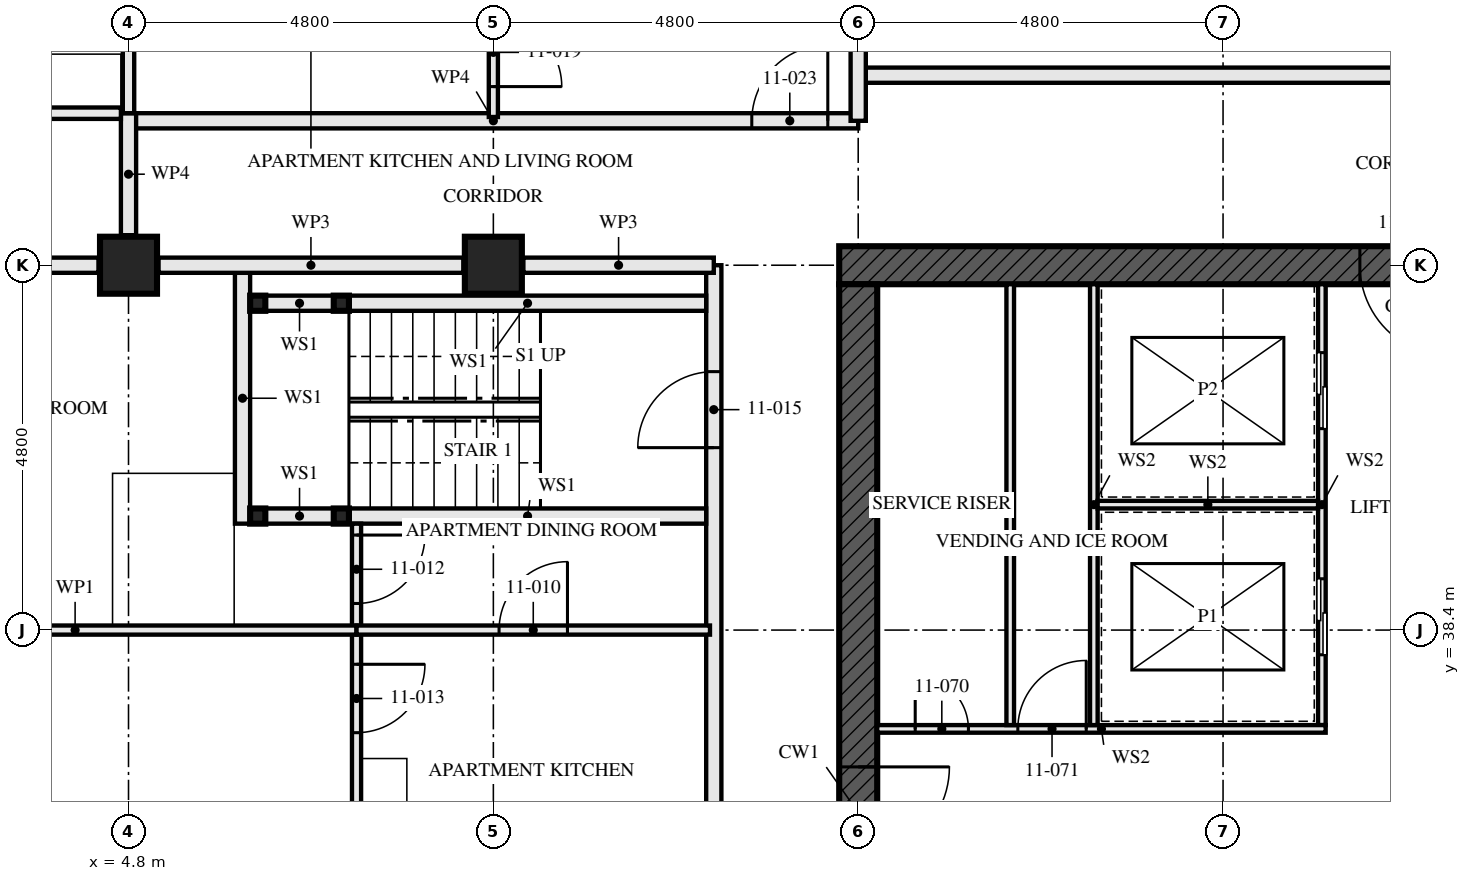
"""IFC4 building model, lengths in metres.
Left out: names, types, materials, properties, quantities, classifications, styles, units other than length and angle.
Written with IfcOpenShell. Run it as: python <this file> out.ifc"""

import sys

from ifc_helpers import new_model, si_unit, direction, frame, frame_2d, origin, origin_2d, place, context, subcontext, project, spatial, rectangle, hollow_rectangle, extrude, element, fill, save


model = new_model("IFC4")
c1 = context("Model", 3, precision=1e-05, world=origin(), true_north=direction((0.0, 1.0)))
c2 = subcontext(c1, "Body", "Model", "MODEL_VIEW")
j1 = project(units=[si_unit("LENGTHUNIT", "METRE"), si_unit("PLANEANGLEUNIT", "RADIAN")], contexts=[c1])
p1 = place(None, origin())
s1 = spatial("IfcSite", under=j1, at=p1, CompositionType="ELEMENT")
p2 = place(p1, origin())
s2 = spatial("IfcBuilding", under=s1, at=p2, CompositionType="ELEMENT")
p3 = place(p2, frame((0.0, 0.0, 44.5)))
s3 = spatial("IfcBuildingStorey", under=s2, at=p3, CompositionType="ELEMENT", Elevation=44.5)
for number, where, z_axis, x_axis in (
    (1, (4.8, 43.2, 0.0), (0.0, 0.0, 1.0), (0.0, 1.0, 0.0)),
    (2, (9.6, 43.2, 0.0), (0.0, 0.0, 1.0), (0.0, 1.0, 0.0)),
):
    element("IfcColumn", number, at=place(p3, frame(where, z_axis=z_axis, x_axis=x_axis)), inside=s3, PredefinedType="COLUMN", context=c2, shape_type="SweptSolid", body=[
        extrude(hollow_rectangle(XDim=0.75, YDim=0.75, WallThickness=0.08, at=origin_2d()), origin(), (0.0, 0.0, 1.0), 3.5),
    ])
p4 = place(p3, frame((29.05, 43.2, -0.17), z_axis=(0.0, 0.0, 1.0), x_axis=(-1.0, 0.0, 0.0)))
e3 = element("IfcWall", 3, at=p4, inside=s3, PredefinedType="SHEAR", context=c2, shape_type="SweptSolid", body=[
    extrude(rectangle(XDim=14.9, YDim=0.5, at=frame_2d((7.45, 0.0))), origin(), (0.0, 0.0, 1.0), 3.5),
])
p5 = place(p4, frame((6.85, 0.0, 0.17)))
e4 = element("IfcOpeningElement", 4, at=p5, cuts=e3, PredefinedType="OPENING", context=c2, shape_type="SweptSolid", body=[
    extrude(rectangle(XDim=1.2, YDim=2.1, at=frame_2d((0.6, 1.05))), frame((0.0, 0.26, 0.0), z_axis=(0.0, -1.0, 0.0), x_axis=(1.0, 0.0, 0.0)), (0.0, 0.0, 1.0), 0.521),
])
p6 = place(p3, frame((14.4, 42.95, -0.17), z_axis=(0.0, 0.0, 1.0), x_axis=(0.0, -1.0, 0.0)))
e5 = element("IfcWall", 5, at=p6, inside=s3, PredefinedType="SHEAR", context=c2, shape_type="SweptSolid", body=[
    extrude(rectangle(XDim=13.9, YDim=0.5, at=frame_2d((6.95, 0.0))), origin(), (0.0, 0.0, 1.0), 3.5),
])
p7 = place(p6, frame((6.35, 0.0, 0.17)))
e6 = element("IfcOpeningElement", 6, at=p7, cuts=e5, PredefinedType="OPENING", context=c2, shape_type="SweptSolid", body=[
    extrude(rectangle(XDim=1.2, YDim=2.1, at=frame_2d((0.6, 1.05))), frame((0.0, 0.26, 0.0), z_axis=(0.0, -1.0, 0.0), x_axis=(1.0, 0.0, 0.0)), (0.0, 0.0, 1.0), 0.521),
])
for number, where, z_axis, x_axis in (
    (7, (6.5, 42.7, 0.0), (0.0, 0.0, 1.0), (1.0, 0.0, 0.0)),
    (8, (6.5, 39.9, 0.0), (0.0, 0.0, 1.0), (1.0, 0.0, 0.0)),
    (9, (7.6, 42.7, 0.0), (0.0, 0.0, 1.0), (1.0, 0.0, 0.0)),
    (10, (7.6, 39.9, 0.0), (0.0, 0.0, 1.0), (1.0, 0.0, 0.0)),
):
    element("IfcColumn", number, at=place(p3, frame(where, z_axis=z_axis, x_axis=x_axis)), inside=s3, PredefinedType="COLUMN", context=c2, shape_type="SweptSolid", body=[
        extrude(hollow_rectangle(XDim=0.2, YDim=0.2, WallThickness=0.008, at=origin_2d()), origin(), (0.0, 0.0, 1.0), 3.33),
    ])
p8 = place(p3, frame((6.6, 42.7, 0.0), z_axis=(0.0, 0.0, 1.0), x_axis=(1.0, 0.0, 0.0)))
e11 = element("IfcWall", 11, at=p8, inside=s3, PredefinedType="SOLIDWALL", context=c2, shape_type="SweptSolid", body=[
    extrude(rectangle(XDim=0.9, YDim=0.2, at=frame_2d((0.45, 0.0))), origin(), (0.0, 0.0, 1.0), 2.99),
])
p9 = place(p3, frame((7.7, 42.7, 0.0), z_axis=(0.0, 0.0, 1.0), x_axis=(1.0, 0.0, 0.0)))
e12 = element("IfcWall", 12, at=p9, inside=s3, PredefinedType="SOLIDWALL", context=c2, shape_type="SweptSolid", body=[
    extrude(rectangle(XDim=4.7, YDim=0.2, at=frame_2d((2.35, 0.0))), origin(), (0.0, 0.0, 1.0), 2.99),
])
p10 = place(p3, frame((6.6, 39.9, 0.0), z_axis=(0.0, 0.0, 1.0), x_axis=(1.0, 0.0, 0.0)))
e13 = element("IfcWall", 13, at=p10, inside=s3, PredefinedType="SOLIDWALL", context=c2, shape_type="SweptSolid", body=[
    extrude(rectangle(XDim=0.9, YDim=0.2, at=frame_2d((0.45, 0.0))), origin(), (0.0, 0.0, 1.0), 2.99),
])
p11 = place(p3, frame((7.7, 39.9, 0.0), z_axis=(0.0, 0.0, 1.0), x_axis=(1.0, 0.0, 0.0)))
e14 = element("IfcWall", 14, at=p11, inside=s3, PredefinedType="SOLIDWALL", context=c2, shape_type="SweptSolid", body=[
    extrude(rectangle(XDim=4.7, YDim=0.2, at=frame_2d((2.35, 0.0))), origin(), (0.0, 0.0, 1.0), 2.99),
])
p12 = place(p3, frame((6.3, 43.1, 0.0), z_axis=(0.0, 0.0, 1.0), x_axis=(0.0, -1.0, 0.0)))
e15 = element("IfcWall", 15, at=p12, inside=s3, PredefinedType="SOLIDWALL", context=c2, shape_type="SweptSolid", body=[
    extrude(rectangle(XDim=3.3, YDim=0.2, at=frame_2d((1.65, 0.0))), origin(), (0.0, 0.0, 1.0), 3.33),
])
p13 = place(p3, frame((7.8, 38.4, 0.0), z_axis=(0.0, 0.0, 1.0), x_axis=(1.0, 0.0, 0.0)))
e16 = element("IfcWall", 16, at=p13, inside=s3, PredefinedType="PARTITIONING", context=c2, shape_type="SweptSolid", body=[
    extrude(rectangle(XDim=4.65, YDim=0.12, at=frame_2d((2.325, 0.0))), origin(), (0.0, 0.0, 1.0), 2.55),
])
p14 = place(p13, frame((1.875, 0.0, 0.0)))
e17 = element("IfcOpeningElement", 17, at=p14, cuts=e16, PredefinedType="OPENING", context=c2, shape_type="SweptSolid", body=[
    extrude(rectangle(XDim=0.9, YDim=2.1, at=frame_2d((0.45, 1.05))), frame((0.0, 0.071, 0.0), z_axis=(0.0, -1.0, 0.0), x_axis=(1.0, 0.0, 0.0)), (0.0, 0.0, 1.0), 0.141),
])
p15 = place(p3, frame((7.8, 39.8, 0.0), z_axis=(0.0, 0.0, 1.0), x_axis=(0.0, -1.0, 0.0)))
e18 = element("IfcWall", 18, at=p15, inside=s3, PredefinedType="PARTITIONING", context=c2, shape_type="SweptSolid", body=[
    extrude(rectangle(XDim=1.4, YDim=0.12, at=frame_2d((0.7, 0.0))), origin(), (0.0, 0.0, 1.0), 3.33),
])
p16 = place(p15, frame((0.15, 0.0, 0.0)))
e19 = element("IfcOpeningElement", 19, at=p16, cuts=e18, PredefinedType="OPENING", context=c2, shape_type="SweptSolid", body=[
    extrude(rectangle(XDim=0.9, YDim=2.1, at=frame_2d((0.45, 1.05))), frame((0.0, 0.071, 0.0), z_axis=(0.0, -1.0, 0.0), x_axis=(1.0, 0.0, 0.0)), (0.0, 0.0, 1.0), 0.141),
])
p17 = place(p3, frame((7.8, 38.4, 0.0), z_axis=(0.0, 0.0, 1.0), x_axis=(0.0, -1.0, 0.0)))
e20 = element("IfcWall", 20, at=p17, inside=s3, PredefinedType="PARTITIONING", context=c2, shape_type="SweptSolid", body=[
    extrude(rectangle(XDim=4.8, YDim=0.12, at=frame_2d((2.4, 0.0))), origin(), (0.0, 0.0, 1.0), 3.33),
])
p18 = place(p17, frame((0.45, 0.0, 0.0)))
e21 = element("IfcOpeningElement", 21, at=p18, cuts=e20, PredefinedType="OPENING", context=c2, shape_type="SweptSolid", body=[
    extrude(rectangle(XDim=0.9, YDim=2.1, at=frame_2d((0.45, 1.05))), frame((0.0, 0.071, 0.0), z_axis=(0.0, -1.0, 0.0), x_axis=(1.0, 0.0, 0.0)), (0.0, 0.0, 1.0), 0.141),
])
p19 = place(p3, frame((0.395, 38.4, 0.0), z_axis=(0.0, 0.0, 1.0), x_axis=(1.0, 0.0, 0.0)))
e22 = element("IfcWall", 22, at=p19, inside=s3, PredefinedType="PARTITIONING", context=c2, shape_type="SweptSolid", body=[
    extrude(rectangle(XDim=7.405, YDim=0.12, at=frame_2d((3.703, 0.0))), origin(), (0.0, 0.0, 1.0), 2.55),
])
p20 = place(p3, frame((12.5, 43.2, 0.0), z_axis=(0.0, 0.0, 1.0), x_axis=(0.0, -1.0, 0.0)))
e23 = element("IfcWall", 23, at=p20, inside=s3, PredefinedType="PARTITIONING", context=c2, shape_type="SweptSolid", body=[
    extrude(rectangle(XDim=14.4, YDim=0.2, at=frame_2d((7.2, 0.0))), origin(), (0.0, 0.0, 1.0), 2.55),
])
p21 = place(p20, frame((1.4, 0.0, 0.0)))
e24 = element("IfcOpeningElement", 24, at=p21, cuts=e23, PredefinedType="OPENING", context=c2, shape_type="SweptSolid", body=[
    extrude(rectangle(XDim=1.0, YDim=2.1, at=frame_2d((0.5, 1.05))), frame((0.0, 0.111, 0.0), z_axis=(0.0, -1.0, 0.0), x_axis=(1.0, 0.0, 0.0)), (0.0, 0.0, 1.0), 0.221),
])
p22 = place(p20, frame((10.0, 0.0, 0.0)))
e25 = element("IfcOpeningElement", 25, at=p22, cuts=e23, PredefinedType="OPENING", context=c2, shape_type="SweptSolid", body=[
    extrude(rectangle(XDim=1.0, YDim=2.1, at=frame_2d((0.5, 1.05))), frame((0.0, 0.111, 0.0), z_axis=(0.0, -1.0, 0.0), x_axis=(1.0, 0.0, 0.0)), (0.0, 0.0, 1.0), 0.221),
])
p23 = place(p3, frame((4.8, 48.2, 0.0), z_axis=(0.0, 0.0, 1.0), x_axis=(0.0, -1.0, 0.0)))
e26 = element("IfcWall", 26, at=p23, inside=s3, PredefinedType="PARTITIONING", context=c2, shape_type="SweptSolid", body=[
    extrude(rectangle(XDim=3.0, YDim=0.15, at=frame_2d((1.5, 0.0))), origin(), (0.0, 0.0, 1.0), 2.55),
])
p24 = place(p23, frame((1.05, 0.0, 0.0)))
e27 = element("IfcOpeningElement", 27, at=p24, cuts=e26, PredefinedType="OPENING", context=c2, shape_type="SweptSolid", body=[
    extrude(rectangle(XDim=0.9, YDim=2.1, at=frame_2d((0.45, 1.05))), frame((0.0, 0.085, 0.0), z_axis=(0.0, -1.0, 0.0), x_axis=(1.0, 0.0, 0.0)), (0.0, 0.0, 1.0), 0.171),
])
p25 = place(p3, frame((9.6, 49.8, 0.0), z_axis=(0.0, 0.0, 1.0), x_axis=(0.0, -1.0, 0.0)))
e28 = element("IfcWall", 28, at=p25, inside=s3, PredefinedType="PARTITIONING", context=c2, shape_type="SweptSolid", body=[
    extrude(rectangle(XDim=4.65, YDim=0.12, at=frame_2d((2.325, 0.0))), origin(), (0.0, 0.0, 1.0), 2.55),
])
p26 = place(p25, frame((3.35, 0.0, 0.0)))
e29 = element("IfcOpeningElement", 29, at=p26, cuts=e28, PredefinedType="OPENING", context=c2, shape_type="SweptSolid", body=[
    extrude(rectangle(XDim=0.9, YDim=2.1, at=frame_2d((0.45, 1.05))), frame((0.0, 0.071, 0.0), z_axis=(0.0, -1.0, 0.0), x_axis=(1.0, 0.0, 0.0)), (0.0, 0.0, 1.0), 0.141),
])
p27 = place(p3, frame((14.4, 45.1, 0.0), z_axis=(0.0, 0.0, 1.0), x_axis=(-1.0, 0.0, 0.0)))
e30 = element("IfcWall", 30, at=p27, inside=s3, PredefinedType="PARTITIONING", context=c2, shape_type="SweptSolid", body=[
    extrude(rectangle(XDim=9.6, YDim=0.2, at=frame_2d((4.8, 0.0))), origin(), (0.0, 0.0, 1.0), 3.33),
])
p28 = place(p27, frame((0.4, 0.0, 0.0)))
e31 = element("IfcOpeningElement", 31, at=p28, cuts=e30, PredefinedType="OPENING", context=c2, shape_type="SweptSolid", body=[
    extrude(rectangle(XDim=1.0, YDim=2.1, at=frame_2d((0.5, 1.05))), frame((0.0, 0.111, 0.0), z_axis=(0.0, -1.0, 0.0), x_axis=(1.0, 0.0, 0.0)), (0.0, 0.0, 1.0), 0.221),
])
p29 = place(p3, frame((4.8, 45.2, 0.0), z_axis=(0.0, 0.0, 1.0), x_axis=(0.0, -1.0, 0.0)))
e32 = element("IfcWall", 32, at=p29, inside=s3, PredefinedType="PARTITIONING", context=c2, shape_type="SweptSolid", body=[
    extrude(rectangle(XDim=1.605, YDim=0.2, at=frame_2d((0.802, 0.0))), origin(), (0.0, 0.0, 1.0), 3.33),
])
p30 = place(p3, frame((28.8, 45.7, 0.0), z_axis=(0.0, 0.0, 1.0), x_axis=(-1.0, 0.0, 0.0)))
e33 = element("IfcWall", 33, at=p30, inside=s3, PredefinedType="PARTITIONING", context=c2, shape_type="SweptSolid", body=[
    extrude(rectangle(XDim=14.4, YDim=0.2, at=frame_2d((7.2, 0.0))), origin(), (0.0, 0.0, 1.0), 3.33),
])
p31 = place(p30, frame((0.4, 0.0, 0.0)))
e34 = element("IfcOpeningElement", 34, at=p31, cuts=e33, PredefinedType="OPENING", context=c2, shape_type="SweptSolid", body=[
    extrude(rectangle(XDim=1.0, YDim=2.1, at=frame_2d((0.5, 1.05))), frame((0.0, 0.111, 0.0), z_axis=(0.0, -1.0, 0.0), x_axis=(1.0, 0.0, 0.0)), (0.0, 0.0, 1.0), 0.221),
])
p32 = place(p3, frame((16.4, 37.15, 0.0), z_axis=(0.0, 0.0, 1.0), x_axis=(0.0, 1.0, 0.0)))
e35 = element("IfcWall", 35, at=p32, inside=s3, PredefinedType="SOLIDWALL", context=c2, shape_type="SweptSolid", body=[
    extrude(rectangle(XDim=5.8, YDim=0.1, at=frame_2d((2.9, 0.0))), origin(), (0.0, 0.0, 1.0), 3.33),
])
p33 = place(p3, frame((20.5, 37.15, 0.0), z_axis=(0.0, 0.0, 1.0), x_axis=(0.0, 1.0, 0.0)))
e36 = element("IfcWall", 36, at=p33, inside=s3, PredefinedType="SOLIDWALL", context=c2, shape_type="SweptSolid", body=[
    extrude(rectangle(XDim=5.8, YDim=0.1, at=frame_2d((2.9, 0.0))), origin(), (0.0, 0.0, 1.0), 3.33),
])
p34 = place(p33, frame((0.925, 0.0, 0.0)))
e37 = element("IfcOpeningElement", 37, at=p34, cuts=e36, PredefinedType="OPENING", context=c2, shape_type="SweptSolid", body=[
    extrude(rectangle(XDim=1.0, YDim=2.1, at=frame_2d((0.5, 1.05))), frame((0.0, 0.061, 0.0), z_axis=(0.0, -1.0, 0.0), x_axis=(1.0, 0.0, 0.0)), (0.0, 0.0, 1.0), 0.121),
])
p35 = place(p33, frame((3.9, 0.0, 0.0)))
e38 = element("IfcOpeningElement", 38, at=p35, cuts=e36, PredefinedType="OPENING", context=c2, shape_type="SweptSolid", body=[
    extrude(rectangle(XDim=1.0, YDim=2.1, at=frame_2d((0.5, 1.05))), frame((0.0, 0.061, 0.0), z_axis=(0.0, -1.0, 0.0), x_axis=(1.0, 0.0, 0.0)), (0.0, 0.0, 1.0), 0.121),
])
p36 = place(p3, frame((14.65, 37.1, 0.0), z_axis=(0.0, 0.0, 1.0), x_axis=(1.0, 0.0, 0.0)))
e39 = element("IfcWall", 39, at=p36, inside=s3, PredefinedType="SOLIDWALL", context=c2, shape_type="SweptSolid", body=[
    extrude(rectangle(XDim=5.9, YDim=0.1, at=frame_2d((2.95, 0.0))), origin(), (0.0, 0.0, 1.0), 3.33),
])
p37 = place(p36, frame((0.5, 0.0, 0.0)))
e40 = element("IfcOpeningElement", 40, at=p37, cuts=e39, PredefinedType="OPENING", context=c2, shape_type="SweptSolid", body=[
    extrude(rectangle(XDim=0.7, YDim=2.1, at=frame_2d((0.35, 1.05))), frame((0.0, 0.061, 0.0), z_axis=(0.0, -1.0, 0.0), x_axis=(1.0, 0.0, 0.0)), (0.0, 0.0, 1.0), 0.121),
])
p38 = place(p36, frame((1.85, 0.0, 0.0)))
e41 = element("IfcOpeningElement", 41, at=p38, cuts=e39, PredefinedType="OPENING", context=c2, shape_type="SweptSolid", body=[
    extrude(rectangle(XDim=0.9, YDim=2.1, at=frame_2d((0.45, 1.05))), frame((0.0, 0.061, 0.0), z_axis=(0.0, -1.0, 0.0), x_axis=(1.0, 0.0, 0.0)), (0.0, 0.0, 1.0), 0.121),
])
p39 = place(p3, frame((17.5, 37.15, 0.0), z_axis=(0.0, 0.0, 1.0), x_axis=(0.0, 1.0, 0.0)))
e42 = element("IfcWall", 42, at=p39, inside=s3, PredefinedType="SOLIDWALL", context=c2, shape_type="SweptSolid", body=[
    extrude(rectangle(XDim=5.8, YDim=0.1, at=frame_2d((2.9, 0.0))), origin(), (0.0, 0.0, 1.0), 3.33),
])
p40 = place(p3, frame((17.55, 40.05, 0.0), z_axis=(0.0, 0.0, 1.0), x_axis=(1.0, 0.0, 0.0)))
e43 = element("IfcWall", 43, at=p40, inside=s3, PredefinedType="SOLIDWALL", context=c2, shape_type="SweptSolid", body=[
    extrude(rectangle(XDim=2.9, YDim=0.1, at=frame_2d((1.45, 0.0))), origin(), (0.0, 0.0, 1.0), 3.33),
])
p41 = place(p3, frame((12.5, 43.2, 0.0), z_axis=(0.0, 0.0, 1.0), x_axis=(-1.0, 0.0, 0.0)))
e44 = element("IfcWall", 44, at=p41, inside=s3, PredefinedType="PARTITIONING", context=c2, shape_type="SweptSolid", body=[
    extrude(rectangle(XDim=2.505, YDim=0.2, at=frame_2d((1.252, 0.0))), origin(), (0.0, 0.0, 1.0), 2.32),
])
p42 = place(p3, frame((9.205, 43.2, 0.0), z_axis=(0.0, 0.0, 1.0), x_axis=(-1.0, 0.0, 0.0)))
e45 = element("IfcWall", 45, at=p42, inside=s3, PredefinedType="PARTITIONING", context=c2, shape_type="SweptSolid", body=[
    extrude(rectangle(XDim=4.01, YDim=0.2, at=frame_2d((2.005, 0.0))), origin(), (0.0, 0.0, 1.0), 2.32),
])
p43 = place(p3, frame((4.405, 43.2, 0.0), z_axis=(0.0, 0.0, 1.0), x_axis=(-1.0, 0.0, 0.0)))
e46 = element("IfcWall", 46, at=p43, inside=s3, PredefinedType="PARTITIONING", context=c2, shape_type="SweptSolid", body=[
    extrude(rectangle(XDim=4.085, YDim=0.2, at=frame_2d((2.042, 0.0))), origin(), (0.0, 0.0, 1.0), 2.32),
])
p44 = place(p3, frame((14.4, 45.1, 0.0), z_axis=(0.0, 0.0, 1.0), x_axis=(0.0, 1.0, 0.0)))
e47 = element("IfcWall", 47, at=p44, inside=s3, PredefinedType="PARTITIONING", context=c2, shape_type="SweptSolid", body=[
    extrude(rectangle(XDim=2.555, YDim=0.2, at=frame_2d((1.277, 0.0))), origin(), (0.0, 0.0, 1.0), 2.32),
])
p45 = place(p3, frame((4.7, 45.2, 0.0), z_axis=(0.0, 0.0, 1.0), x_axis=(-1.0, 0.0, 0.0)))
e48 = element("IfcWall", 48, at=p45, inside=s3, PredefinedType="PARTITIONING", context=c2, shape_type="SweptSolid", body=[
    extrude(rectangle(XDim=5.135, YDim=0.15, at=frame_2d((2.567, 0.0))), origin(), (0.0, 0.0, 1.0), 2.32),
])
p46 = place(p14, origin())
e49 = element("IfcDoor", 49, at=p46, inside=s3, OperationType="SINGLE_SWING_LEFT", PredefinedType="DOOR", context=c2, shape_type="SweptSolid", body=[
    extrude(rectangle(XDim=0.9, YDim=2.1, at=frame_2d((0.45, 1.05))), frame((0.0, 0.022, 0.0), z_axis=(0.0, -1.0, 0.0), x_axis=(1.0, 0.0, 0.0)), (0.0, 0.0, 1.0), 0.044),
])
fill(e17, e49)
p47 = place(p16, origin())
e50 = element("IfcDoor", 50, at=p47, inside=s3, OperationType="SINGLE_SWING_RIGHT", PredefinedType="DOOR", context=c2, shape_type="SweptSolid", body=[
    extrude(rectangle(XDim=0.9, YDim=2.1, at=frame_2d((0.45, 1.05))), frame((0.0, 0.022, 0.0), z_axis=(0.0, -1.0, 0.0), x_axis=(1.0, 0.0, 0.0)), (0.0, 0.0, 1.0), 0.044),
])
fill(e19, e50)
p48 = place(p18, origin())
e51 = element("IfcDoor", 51, at=p48, inside=s3, OperationType="SINGLE_SWING_RIGHT", PredefinedType="DOOR", context=c2, shape_type="SweptSolid", body=[
    extrude(rectangle(XDim=0.9, YDim=2.1, at=frame_2d((0.45, 1.05))), frame((0.0, 0.022, 0.0), z_axis=(0.0, -1.0, 0.0), x_axis=(1.0, 0.0, 0.0)), (0.0, 0.0, 1.0), 0.044),
])
fill(e21, e51)
p49 = place(p21, frame((1.0, 0.0, 0.0), z_axis=(0.0, 0.0, 1.0), x_axis=(-1.0, 0.0, 0.0)))
e52 = element("IfcDoor", 52, at=p49, inside=s3, OperationType="SINGLE_SWING_RIGHT", PredefinedType="DOOR", context=c2, shape_type="SweptSolid", body=[
    extrude(rectangle(XDim=1.0, YDim=2.1, at=frame_2d((0.5, 1.05))), frame((0.0, 0.032, 0.0), z_axis=(0.0, -1.0, 0.0), x_axis=(1.0, 0.0, 0.0)), (0.0, 0.0, 1.0), 0.064),
])
fill(e24, e52)
p50 = place(p26, origin())
e53 = element("IfcDoor", 53, at=p50, inside=s3, OperationType="SINGLE_SWING_LEFT", PredefinedType="DOOR", context=c2, shape_type="SweptSolid", body=[
    extrude(rectangle(XDim=0.9, YDim=2.1, at=frame_2d((0.45, 1.05))), frame((0.0, 0.022, 0.0), z_axis=(0.0, -1.0, 0.0), x_axis=(1.0, 0.0, 0.0)), (0.0, 0.0, 1.0), 0.044),
])
fill(e29, e53)
p51 = place(p28, frame((1.0, 0.0, 0.0), z_axis=(0.0, 0.0, 1.0), x_axis=(-1.0, 0.0, 0.0)))
e54 = element("IfcDoor", 54, at=p51, inside=s3, OperationType="SINGLE_SWING_LEFT", PredefinedType="DOOR", context=c2, shape_type="SweptSolid", body=[
    extrude(rectangle(XDim=1.0, YDim=2.1, at=frame_2d((0.5, 1.05))), frame((0.0, 0.027, 0.0), z_axis=(0.0, -1.0, 0.0), x_axis=(1.0, 0.0, 0.0)), (0.0, 0.0, 1.0), 0.054),
])
fill(e31, e54)
p52 = place(p34, origin())
e55 = element("IfcDoor", 55, at=p52, inside=s3, OperationType="SLIDING_TO_LEFT", PredefinedType="DOOR", context=c2, shape_type="SweptSolid", body=[
    extrude(rectangle(XDim=1.0, YDim=2.1, at=frame_2d((0.5, 1.05))), frame((0.0, 0.05, 0.0), z_axis=(0.0, -1.0, 0.0), x_axis=(1.0, 0.0, 0.0)), (0.0, 0.0, 1.0), 0.1),
])
fill(e37, e55)
p53 = place(p35, origin())
e56 = element("IfcDoor", 56, at=p53, inside=s3, OperationType="SLIDING_TO_LEFT", PredefinedType="DOOR", context=c2, shape_type="SweptSolid", body=[
    extrude(rectangle(XDim=1.0, YDim=2.1, at=frame_2d((0.5, 1.05))), frame((0.0, 0.05, 0.0), z_axis=(0.0, -1.0, 0.0), x_axis=(1.0, 0.0, 0.0)), (0.0, 0.0, 1.0), 0.1),
])
fill(e38, e56)
p54 = place(p37, origin())
e57 = element("IfcDoor", 57, at=p54, inside=s3, OperationType="SINGLE_SWING_RIGHT", PredefinedType="DOOR", context=c2, shape_type="SweptSolid", body=[
    extrude(rectangle(XDim=0.7, YDim=2.1, at=frame_2d((0.35, 1.05))), frame((0.0, 0.027, 0.0), z_axis=(0.0, -1.0, 0.0), x_axis=(1.0, 0.0, 0.0)), (0.0, 0.0, 1.0), 0.054),
])
fill(e40, e57)
p55 = place(p38, origin())
e58 = element("IfcDoor", 58, at=p55, inside=s3, OperationType="SINGLE_SWING_LEFT", PredefinedType="DOOR", context=c2, shape_type="SweptSolid", body=[
    extrude(rectangle(XDim=0.9, YDim=2.1, at=frame_2d((0.45, 1.05))), frame((0.0, 0.027, 0.0), z_axis=(0.0, -1.0, 0.0), x_axis=(1.0, 0.0, 0.0)), (0.0, 0.0, 1.0), 0.054),
])
fill(e41, e58)
p56 = place(p7, origin())
e59 = element("IfcDoor", 59, at=p56, inside=s3, OperationType="SINGLE_SWING_LEFT", PredefinedType="DOOR", context=c2, shape_type="SweptSolid", body=[
    extrude(rectangle(XDim=1.2, YDim=2.1, at=frame_2d((0.6, 1.05))), frame((0.0, 0.027, 0.0), z_axis=(0.0, -1.0, 0.0), x_axis=(1.0, 0.0, 0.0)), (0.0, 0.0, 1.0), 0.054),
])
fill(e6, e59)
p57 = place(p5, origin())
e60 = element("IfcDoor", 60, at=p57, inside=s3, OperationType="SINGLE_SWING_LEFT", PredefinedType="DOOR", context=c2, shape_type="SweptSolid", body=[
    extrude(rectangle(XDim=1.2, YDim=2.1, at=frame_2d((0.6, 1.05))), frame((0.0, 0.027, 0.0), z_axis=(0.0, -1.0, 0.0), x_axis=(1.0, 0.0, 0.0)), (0.0, 0.0, 1.0), 0.054),
])
fill(e4, e60)
save(model, sys.argv[1])
